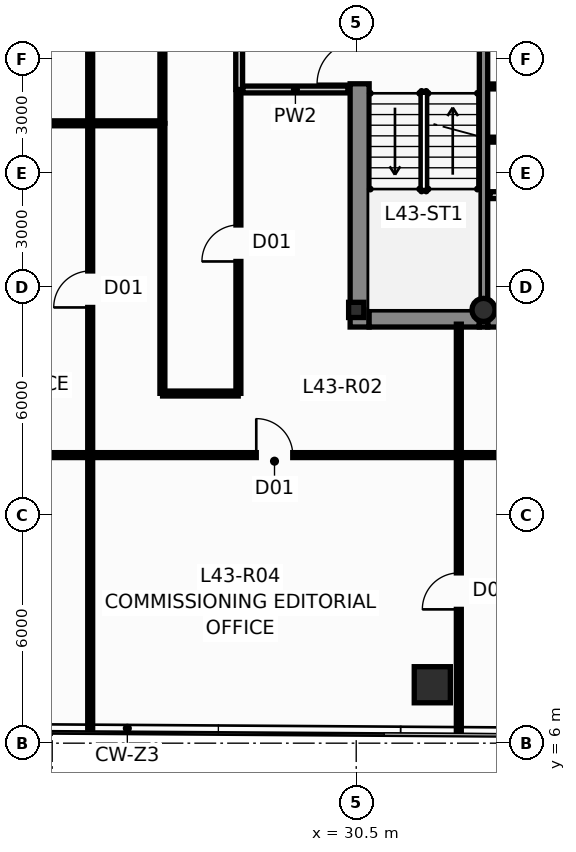
"""IFC4 building model, lengths in metres.
Left out: names, types, materials, properties, quantities, classifications, styles, units other than length and angle.
Written with IfcOpenShell. Run it as: python <this file> out.ifc"""

import sys

from ifc_helpers import new_model, si_unit, direction, frame, frame_2d, origin, origin_2d, place, context, subcontext, project, spatial, rectangle, hollow_rectangle, hollow_circle, i_section, extrude, source, transform, mapped, element, fill, save


model = new_model("IFC4")
c1 = context("Model", 3, precision=1e-05, world=origin(), true_north=direction((0.0, 1.0)))
c2 = subcontext(c1, "Body", "Model", "MODEL_VIEW")
j1 = project(units=[si_unit("LENGTHUNIT", "METRE"), si_unit("PLANEANGLEUNIT", "RADIAN")], contexts=[c1])
p1 = place(None, origin())
s1 = spatial("IfcSite", under=j1, at=p1, CompositionType="ELEMENT")
p2 = place(p1, origin())
s2 = spatial("IfcBuilding", under=s1, at=p2, CompositionType="ELEMENT")
p3 = place(p2, frame((0.0, 0.0, 165.8)))
s3 = spatial("IfcBuildingStorey", under=s2, at=p3, CompositionType="ELEMENT", Elevation=165.8)
m1 = source(origin(), c2, "Body", "SweptSolid", [
    extrude(i_section(OverallWidth=0.4, OverallDepth=0.4, WebThickness=0.02, FlangeThickness=0.032, at=origin_2d()), origin(), (0.0, 0.0, 1.0), 3.65),
])
p4 = place(p3, frame((30.5, 17.4, 0.0), z_axis=(0.0, 0.0, 1.0), x_axis=(1.0, 0.0, 0.0)))
e1 = element("IfcColumn", 1, at=p4, inside=s3, PredefinedType="COLUMN", context=c2, shape_type="MappedRepresentation", body=[
    mapped(m1, transform((0.0, 0.0, 0.0), scale=1.0)),
])
m2 = source(origin(), c2, "Body", "SweptSolid", [
    extrude(hollow_circle(Radius=0.305, WallThickness=0.025, at=origin_2d()), origin(), (0.0, 0.0, 1.0), 3.65),
])
p5 = place(p3, frame((33.85, 17.4, 0.0), z_axis=(0.0, 0.0, 1.0), x_axis=(1.0, 0.0, 0.0)))
e2 = element("IfcColumn", 2, at=p5, inside=s3, PredefinedType="COLUMN", context=c2, shape_type="MappedRepresentation", body=[
    mapped(m2, transform((0.0, 0.0, 0.0), scale=1.0)),
])
p6 = place(p3, frame((30.59, 16.95, 0.0), z_axis=(0.0, 0.0, 1.0), x_axis=(0.0, 1.0, 0.0)))
e3 = element("IfcWall", 3, at=p6, inside=s3, PredefinedType="SHEAR", context=c2, shape_type="SweptSolid", body=[
    extrude(rectangle(XDim=13.275, YDim=0.5, at=frame_2d((6.638, 0.0))), origin(), (0.0, 0.0, 1.0), 3.65),
])
p7 = place(p6, frame((6.4, 0.0, 0.0)))
e4 = element("IfcOpeningElement", 4, at=p7, cuts=e3, PredefinedType="OPENING", context=c2, shape_type="SweptSolid", body=[
    extrude(rectangle(XDim=1.12, YDim=2.15, at=frame_2d((0.56, 1.075))), frame((0.0, 0.262, 0.0), z_axis=(0.0, -1.0, 0.0), x_axis=(1.0, 0.0, 0.0)), (0.0, 0.0, 1.0), 0.524),
])
p8 = place(p6, frame((10.85, 0.0, 0.0)))
e5 = element("IfcOpeningElement", 5, at=p8, cuts=e3, PredefinedType="OPENING", context=c2, shape_type="SweptSolid", body=[
    extrude(rectangle(XDim=1.2, YDim=2.2, at=frame_2d((0.6, 1.1))), frame((0.0, 0.262, 0.0), z_axis=(0.0, -1.0, 0.0), x_axis=(1.0, 0.0, 0.0)), (0.0, 0.0, 1.0), 0.524),
])
p9 = place(p3, frame((30.84, 17.175, 0.0), z_axis=(0.0, 0.0, 1.0), x_axis=(1.0, 0.0, 0.0)))
e6 = element("IfcWall", 6, at=p9, inside=s3, PredefinedType="SHEAR", context=c2, shape_type="SweptSolid", body=[
    extrude(rectangle(XDim=2.9, YDim=0.45, at=frame_2d((1.45, 0.0))), origin(), (0.0, 0.0, 1.0), 3.65),
])
p10 = place(p3, frame((33.96, 17.175, 0.0), z_axis=(0.0, 0.0, 1.0), x_axis=(1.0, 0.0, 0.0)))
e7 = element("IfcWall", 7, at=p10, inside=s3, PredefinedType="SHEAR", context=c2, shape_type="SweptSolid", body=[
    extrude(rectangle(XDim=8.08, YDim=0.45, at=frame_2d((4.04, 0.0))), origin(), (0.0, 0.0, 1.0), 3.65),
])
p11 = place(p3, frame((33.85, 16.95, 0.0), z_axis=(0.0, 0.0, 1.0), x_axis=(0.0, 1.0, 0.0)))
e8 = element("IfcWall", 8, at=p11, inside=s3, PredefinedType="SHEAR", context=c2, shape_type="SweptSolid", body=[
    extrude(rectangle(XDim=13.275, YDim=0.22, at=frame_2d((6.638, 0.0))), origin(), (0.0, 0.0, 1.0), 3.65),
])
m3 = source(origin(), c2, "Body", "SweptSolid", [
    extrude(hollow_rectangle(XDim=0.95, YDim=0.95, WallThickness=0.05, at=origin_2d()), origin(), (0.0, 0.0, 1.0), 3.651),
])
p12 = place(p3, frame((32.502, 7.537, 0.0), z_axis=(-0.004547556686, 0.019795246753, 0.99979371269), x_axis=(-0.974612694662, -0.223897510936, 0.0)))
e9 = element("IfcColumn", 9, at=p12, inside=s3, PredefinedType="COLUMN", context=c2, shape_type="MappedRepresentation", body=[
    mapped(m3, transform((0.0, 0.0, 0.0), scale=1.0)),
])
p13 = place(p3, frame((27.42, 23.2, 0.0), z_axis=(0.0, 0.0, 1.0), x_axis=(0.0, 1.0, 0.0)))
e10 = element("IfcWall", 10, at=p13, inside=s3, PredefinedType="PARTITIONING", context=c2, shape_type="SweptSolid", body=[
    extrude(rectangle(XDim=6.4, YDim=0.18, at=frame_2d((3.2, 0.0))), origin(), (0.0, 0.0, 1.0), 3.078),
])
p14 = place(p13, frame((2.65, 0.0, 0.0)))
e11 = element("IfcOpeningElement", 11, at=p14, cuts=e10, PredefinedType="OPENING", context=c2, shape_type="SweptSolid", body=[
    extrude(rectangle(XDim=1.05, YDim=2.15, at=frame_2d((0.525, 1.075))), frame((0.0, 0.102, 0.0), z_axis=(0.0, -1.0, 0.0), x_axis=(1.0, 0.0, 0.0)), (0.0, 0.0, 1.0), 0.204),
])
p15 = place(p3, frame((27.52, 23.2, 0.0), z_axis=(0.0, 0.0, 1.0), x_axis=(1.0, 0.0, 0.0)))
e12 = element("IfcWall", 12, at=p15, inside=s3, PredefinedType="PARTITIONING", context=c2, shape_type="SweptSolid", body=[
    extrude(rectangle(XDim=2.76, YDim=0.18, at=frame_2d((1.38, 0.0))), origin(), (0.0, 0.0, 1.0), 3.4),
])
p16 = place(p3, frame((34.02, 20.42, 0.0), z_axis=(0.0, 0.0, 1.0), x_axis=(1.0, 0.0, 0.0)))
e13 = element("IfcWall", 13, at=p16, inside=s3, PredefinedType="PARTITIONING", context=c2, shape_type="SweptSolid", body=[
    extrude(rectangle(XDim=3.64, YDim=0.18, at=frame_2d((1.82, 0.0))), origin(), (0.0, 0.0, 1.0), 3.4),
])
for number, where, z_axis, x_axis in (
    (14, (34.02, 21.88, 0.0), (0.0, 0.0, 1.0), (1.0, 0.0, 0.0)),
    (15, (34.02, 23.28, 0.0), (0.0, 0.0, 1.0), (1.0, 0.0, 0.0)),
):
    element("IfcWall", number, at=place(p3, frame(where, z_axis=z_axis, x_axis=x_axis)), inside=s3, PredefinedType="PARTITIONING", context=c2, shape_type="SweptSolid", body=[
        extrude(rectangle(XDim=3.58, YDim=0.13, at=frame_2d((1.79, 0.0))), origin(), (0.0, 0.0, 1.0), 3.4),
    ])
p17 = place(p3, frame((13.009, 13.58, 0.0), z_axis=(0.0, 0.0, 1.0), x_axis=(1.0, 0.0, 0.0)))
e16 = element("IfcWall", 16, at=p17, inside=s3, PredefinedType="PARTITIONING", context=c2, shape_type="SweptSolid", body=[
    extrude(rectangle(XDim=10.486, YDim=0.13, at=frame_2d((5.243, 0.0))), origin(), (0.0, 0.0, 1.0), 3.4),
])
p18 = place(p17, frame((4.818, 0.0, 0.0)))
e17 = element("IfcOpeningElement", 17, at=p18, cuts=e16, PredefinedType="OPENING", context=c2, shape_type="SweptSolid", body=[
    extrude(rectangle(XDim=0.96, YDim=2.15, at=frame_2d((0.48, 1.075))), frame((0.0, 0.077, 0.0), z_axis=(0.0, -1.0, 0.0), x_axis=(1.0, 0.0, 0.0)), (0.0, 0.0, 1.0), 0.154),
])
p19 = place(p3, frame((23.505, 13.58, 0.0), z_axis=(0.0, 0.0, 1.0), x_axis=(1.0, 0.0, 0.0)))
e18 = element("IfcWall", 18, at=p19, inside=s3, PredefinedType="PARTITIONING", context=c2, shape_type="SweptSolid", body=[
    extrude(rectangle(XDim=9.69, YDim=0.13, at=frame_2d((4.845, 0.0))), origin(), (0.0, 0.0, 1.0), 3.078),
])
p20 = place(p19, frame((4.365, 0.0, 0.0)))
e19 = element("IfcOpeningElement", 19, at=p20, cuts=e18, PredefinedType="OPENING", context=c2, shape_type="SweptSolid", body=[
    extrude(rectangle(XDim=0.96, YDim=2.15, at=frame_2d((0.48, 1.075))), frame((0.0, 0.077, 0.0), z_axis=(0.0, -1.0, 0.0), x_axis=(1.0, 0.0, 0.0)), (0.0, 0.0, 1.0), 0.154),
])
p21 = place(p3, frame((33.205, 13.58, 0.0), z_axis=(0.0, 0.0, 1.0), x_axis=(1.0, 0.0, 0.0)))
e20 = element("IfcWall", 20, at=p21, inside=s3, PredefinedType="PARTITIONING", context=c2, shape_type="SweptSolid", body=[
    extrude(rectangle(XDim=9.59, YDim=0.13, at=frame_2d((4.795, 0.0))), origin(), (0.0, 0.0, 1.0), 3.078),
])
p22 = place(p21, frame((4.315, 0.0, 0.0)))
e21 = element("IfcOpeningElement", 21, at=p22, cuts=e20, PredefinedType="OPENING", context=c2, shape_type="SweptSolid", body=[
    extrude(rectangle(XDim=0.96, YDim=2.15, at=frame_2d((0.48, 1.075))), frame((0.0, 0.077, 0.0), z_axis=(0.0, -1.0, 0.0), x_axis=(1.0, 0.0, 0.0)), (0.0, 0.0, 1.0), 0.154),
])
p23 = place(p3, frame((23.5, 13.585, 0.0), z_axis=(0.0, 0.0, 1.0), x_axis=(0.0, 1.0, 0.0)))
e22 = element("IfcWall", 22, at=p23, inside=s3, PredefinedType="PARTITIONING", context=c2, shape_type="SweptSolid", body=[
    extrude(rectangle(XDim=8.72, YDim=0.13, at=frame_2d((4.36, 0.0))), origin(), (0.0, 0.0, 1.0), 3.078),
])
p24 = place(p23, frame((3.88, 0.0, 0.0)))
e23 = element("IfcOpeningElement", 23, at=p24, cuts=e22, PredefinedType="OPENING", context=c2, shape_type="SweptSolid", body=[
    extrude(rectangle(XDim=0.96, YDim=2.15, at=frame_2d((0.48, 1.075))), frame((0.0, 0.077, 0.0), z_axis=(0.0, -1.0, 0.0), x_axis=(1.0, 0.0, 0.0)), (0.0, 0.0, 1.0), 0.154),
])
p25 = place(p3, frame((27.4, 15.205, 0.0), z_axis=(0.0, 0.0, 1.0), x_axis=(0.0, 1.0, 0.0)))
e24 = element("IfcWall", 24, at=p25, inside=s3, PredefinedType="PARTITIONING", context=c2, shape_type="SweptSolid", body=[
    extrude(rectangle(XDim=7.9, YDim=0.13, at=frame_2d((3.95, 0.0))), origin(), (0.0, 0.0, 1.0), 3.078),
])
p26 = place(p25, frame((3.47, 0.0, 0.0)))
e25 = element("IfcOpeningElement", 25, at=p26, cuts=e24, PredefinedType="OPENING", context=c2, shape_type="SweptSolid", body=[
    extrude(rectangle(XDim=0.96, YDim=2.15, at=frame_2d((0.48, 1.075))), frame((0.0, 0.077, 0.0), z_axis=(0.0, -1.0, 0.0), x_axis=(1.0, 0.0, 0.0)), (0.0, 0.0, 1.0), 0.154),
])
p27 = place(p3, frame((25.4, 30.095, 0.0), z_axis=(0.0, 0.0, 1.0), x_axis=(0.0, -1.0, 0.0)))
e26 = element("IfcWall", 26, at=p27, inside=s3, PredefinedType="PARTITIONING", context=c2, shape_type="SweptSolid", body=[
    extrude(rectangle(XDim=7.78, YDim=0.13, at=frame_2d((3.89, 0.0))), origin(), (0.0, 0.0, 1.0), 3.078),
])
p28 = place(p27, frame((3.41, 0.0, 0.0)))
e27 = element("IfcOpeningElement", 27, at=p28, cuts=e26, PredefinedType="OPENING", context=c2, shape_type="SweptSolid", body=[
    extrude(rectangle(XDim=0.96, YDim=2.15, at=frame_2d((0.48, 1.075))), frame((0.0, 0.077, 0.0), z_axis=(0.0, -1.0, 0.0), x_axis=(1.0, 0.0, 0.0)), (0.0, 0.0, 1.0), 0.154),
])
p29 = place(p3, frame((23.5, 22.315, 0.0), z_axis=(0.0, 0.0, 1.0), x_axis=(0.0, 1.0, 0.0)))
e28 = element("IfcWall", 28, at=p29, inside=s3, PredefinedType="PARTITIONING", context=c2, shape_type="SweptSolid", body=[
    extrude(rectangle(XDim=7.78, YDim=0.13, at=frame_2d((3.89, 0.0))), origin(), (0.0, 0.0, 1.0), 3.078),
])
p30 = place(p29, frame((3.41, 0.0, 0.0)))
e29 = element("IfcOpeningElement", 29, at=p30, cuts=e28, PredefinedType="OPENING", context=c2, shape_type="SweptSolid", body=[
    extrude(rectangle(XDim=0.96, YDim=2.15, at=frame_2d((0.48, 1.075))), frame((0.0, 0.077, 0.0), z_axis=(0.0, -1.0, 0.0), x_axis=(1.0, 0.0, 0.0)), (0.0, 0.0, 1.0), 0.154),
])
p31 = place(p3, frame((33.2, 6.329, 0.0), z_axis=(0.0, 0.0, 1.0), x_axis=(0.0, 1.0, 0.0)))
e30 = element("IfcWall", 30, at=p31, inside=s3, PredefinedType="PARTITIONING", context=c2, shape_type="SweptSolid", body=[
    extrude(rectangle(XDim=7.246, YDim=0.13, at=frame_2d((3.623, 0.0))), origin(), (0.0, 0.0, 1.0), 3.4),
])
p32 = place(p31, frame((3.192, 0.0, 0.0)))
e31 = element("IfcOpeningElement", 31, at=p32, cuts=e30, PredefinedType="OPENING", context=c2, shape_type="SweptSolid", body=[
    extrude(rectangle(XDim=0.96, YDim=2.15, at=frame_2d((0.48, 1.075))), frame((0.0, 0.077, 0.0), z_axis=(0.0, -1.0, 0.0), x_axis=(1.0, 0.0, 0.0)), (0.0, 0.0, 1.0), 0.154),
])
p33 = place(p3, frame((23.5, 6.393, 0.0), z_axis=(0.0, 0.0, 1.0), x_axis=(0.0, 1.0, 0.0)))
e32 = element("IfcWall", 32, at=p33, inside=s3, PredefinedType="PARTITIONING", context=c2, shape_type="SweptSolid", body=[
    extrude(rectangle(XDim=7.182, YDim=0.13, at=frame_2d((3.591, 0.0))), origin(), (0.0, 0.0, 1.0), 3.4),
])
p34 = place(p3, frame((25.4, 22.305, 0.0), z_axis=(0.0, 0.0, 1.0), x_axis=(0.0, -1.0, 0.0)))
e33 = element("IfcWall", 33, at=p34, inside=s3, PredefinedType="PARTITIONING", context=c2, shape_type="SweptSolid", body=[
    extrude(rectangle(XDim=7.1, YDim=0.13, at=frame_2d((3.55, 0.0))), origin(), (0.0, 0.0, 1.0), 3.078),
])
p35 = place(p3, frame((17.013, 22.31, 0.0), z_axis=(0.0, 0.0, 1.0), x_axis=(1.0, 0.0, 0.0)))
e34 = element("IfcWall", 34, at=p35, inside=s3, PredefinedType="PARTITIONING", context=c2, shape_type="SweptSolid", body=[
    extrude(rectangle(XDim=6.482, YDim=0.13, at=frame_2d((3.241, 0.0))), origin(), (0.0, 0.0, 1.0), 3.4),
])
p36 = place(p3, frame((33.2, 13.585, 0.0), z_axis=(0.0, 0.0, 1.0), x_axis=(0.0, 1.0, 0.0)))
e35 = element("IfcWall", 35, at=p36, inside=s3, PredefinedType="PARTITIONING", context=c2, shape_type="SweptSolid", body=[
    extrude(rectangle(XDim=3.44, YDim=0.13, at=frame_2d((1.72, 0.0))), origin(), (0.0, 0.0, 1.0), 3.4),
])
p37 = place(p3, frame((25.405, 15.2, 0.0), z_axis=(0.0, 0.0, 1.0), x_axis=(1.0, 0.0, 0.0)))
e36 = element("IfcWall", 36, at=p37, inside=s3, PredefinedType="PARTITIONING", context=c2, shape_type="SweptSolid", body=[
    extrude(rectangle(XDim=1.99, YDim=0.13, at=frame_2d((0.995, 0.0))), origin(), (0.0, 0.0, 1.0), 3.4),
])
p38 = place(p3, frame((23.505, 22.31, 0.0), z_axis=(0.0, 0.0, 1.0), x_axis=(1.0, 0.0, 0.0)))
e37 = element("IfcWall", 37, at=p38, inside=s3, PredefinedType="PARTITIONING", context=c2, shape_type="SweptSolid", body=[
    extrude(rectangle(XDim=1.89, YDim=0.13, at=frame_2d((0.945, 0.0))), origin(), (0.0, 0.0, 1.0), 3.4),
])
p39 = place(p7, origin())
e38 = element("IfcDoor", 38, at=p39, inside=s3, OperationType="SINGLE_SWING_LEFT", PredefinedType="DOOR", context=c2, shape_type="SweptSolid", body=[
    extrude(rectangle(XDim=1.12, YDim=2.15, at=frame_2d((0.56, 1.075))), frame((0.0, 0.025, 0.0), z_axis=(0.0, -1.0, 0.0), x_axis=(1.0, 0.0, 0.0)), (0.0, 0.0, 1.0), 0.05),
])
fill(e4, e38)
p40 = place(p20, origin())
e39 = element("IfcDoor", 39, at=p40, inside=s3, OperationType="SINGLE_SWING_LEFT", PredefinedType="DOOR", context=c2, shape_type="SweptSolid", body=[
    extrude(rectangle(XDim=0.96, YDim=2.15, at=frame_2d((0.48, 1.075))), frame((0.0, 0.025, 0.0), z_axis=(0.0, -1.0, 0.0), x_axis=(1.0, 0.0, 0.0)), (0.0, 0.0, 1.0), 0.05),
])
fill(e19, e39)
p41 = place(p24, origin())
e40 = element("IfcDoor", 40, at=p41, inside=s3, OperationType="SINGLE_SWING_LEFT", PredefinedType="DOOR", context=c2, shape_type="SweptSolid", body=[
    extrude(rectangle(XDim=0.96, YDim=2.15, at=frame_2d((0.48, 1.075))), frame((0.0, 0.025, 0.0), z_axis=(0.0, -1.0, 0.0), x_axis=(1.0, 0.0, 0.0)), (0.0, 0.0, 1.0), 0.05),
])
fill(e23, e40)
p42 = place(p26, origin())
e41 = element("IfcDoor", 41, at=p42, inside=s3, OperationType="SINGLE_SWING_LEFT", PredefinedType="DOOR", context=c2, shape_type="SweptSolid", body=[
    extrude(rectangle(XDim=0.96, YDim=2.15, at=frame_2d((0.48, 1.075))), frame((0.0, 0.025, 0.0), z_axis=(0.0, -1.0, 0.0), x_axis=(1.0, 0.0, 0.0)), (0.0, 0.0, 1.0), 0.05),
])
fill(e25, e41)
p43 = place(p32, origin())
e42 = element("IfcDoor", 42, at=p43, inside=s3, OperationType="SINGLE_SWING_LEFT", PredefinedType="DOOR", context=c2, shape_type="SweptSolid", body=[
    extrude(rectangle(XDim=0.96, YDim=2.15, at=frame_2d((0.48, 1.075))), frame((0.0, 0.025, 0.0), z_axis=(0.0, -1.0, 0.0), x_axis=(1.0, 0.0, 0.0)), (0.0, 0.0, 1.0), 0.05),
])
fill(e31, e42)
save(model, sys.argv[1])
